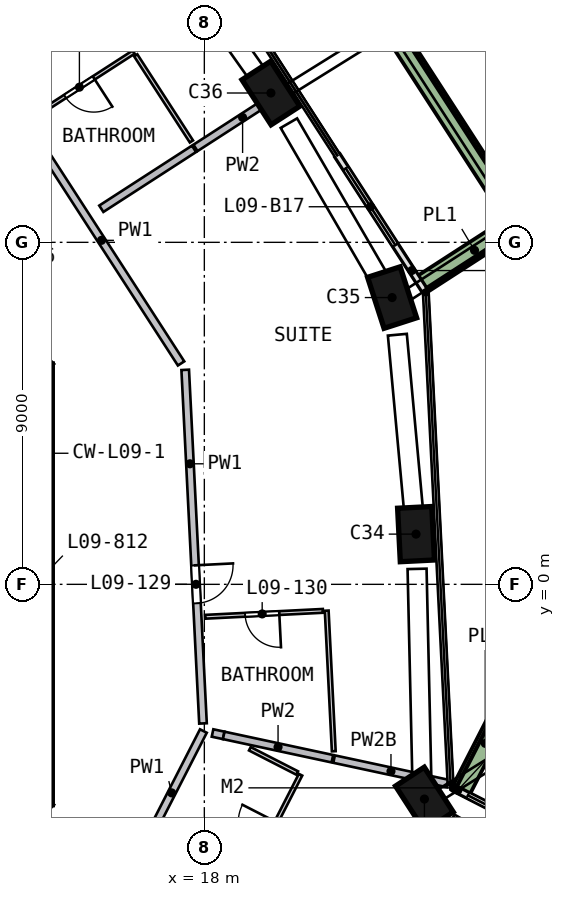
"""IFC4 building model, lengths in metres.
Left out: names, types, materials, properties, quantities, classifications, styles, units other than length and angle.
Written with IfcOpenShell. Run it as: python <this file> out.ifc"""

import sys

from ifc_helpers import new_model, si_unit, direction, frame, frame_2d, origin, origin_2d, place, context, subcontext, project, spatial, rectangle, extrude, element, fill, save


model = new_model("IFC4")
c1 = context("Model", 3, precision=1e-05, world=origin(), true_north=direction((0.0, 1.0)))
c2 = subcontext(c1, "Body", "Model", "MODEL_VIEW")
j1 = project(units=[si_unit("LENGTHUNIT", "METRE"), si_unit("PLANEANGLEUNIT", "RADIAN")], contexts=[c1])
p1 = place(None, origin())
s1 = spatial("IfcSite", under=j1, at=p1, CompositionType="ELEMENT")
p2 = place(p1, origin())
s2 = spatial("IfcBuilding", under=s1, at=p2, CompositionType="ELEMENT")
p3 = place(p2, frame((0.0, 0.0, 46.0)))
s3 = spatial("IfcBuildingStorey", under=s2, at=p3, CompositionType="ELEMENT", Elevation=46.0)
p4 = place(p3, frame((23.759, -5.787, 0.0), z_axis=(0.026605167, 0.113261996, 0.993208883), x_axis=(0.546657728, -0.833486919, 0.080404508)))
e1 = element("IfcColumn", 1, at=p4, inside=s3, PredefinedType="COLUMN", context=c2, shape_type="SweptSolid", body=[
    extrude(rectangle(XDim=1.4, YDim=0.9, at=origin_2d()), origin(), (0.0, 0.0, 1.0), 3.212),
])
p5 = place(p3, frame((23.579, 1.186, 0.0), z_axis=(-0.006616389, 0.112098353, 0.993675089), x_axis=(-0.050128839, 0.992410287, -0.112289451)))
e2 = element("IfcColumn", 2, at=p5, inside=s3, PredefinedType="COLUMN", context=c2, shape_type="SweptSolid", body=[
    extrude(rectangle(XDim=1.4, YDim=0.9, at=origin_2d()), origin(), (0.0, 0.0, 1.0), 3.21),
])
p6 = place(p3, frame((22.985, 7.415, 0.0), z_axis=(-0.036189266, 0.109023965, 0.993380145), x_axis=(0.304935678, -0.945420162, 0.114869271)))
e3 = element("IfcColumn", 3, at=p6, inside=s3, PredefinedType="COLUMN", context=c2, shape_type="SweptSolid", body=[
    extrude(rectangle(XDim=1.4, YDim=0.9, at=origin_2d()), origin(), (0.0, 0.0, 1.0), 3.211),
])
p7 = place(p3, frame((19.826, 12.816, 0.0), z_axis=(-0.061752629, 0.093845743, 0.993669759), x_axis=(-0.539148529, 0.83468518, -0.112336608)))
e4 = element("IfcColumn", 4, at=p7, inside=s3, PredefinedType="COLUMN", context=c2, shape_type="SweptSolid", body=[
    extrude(rectangle(XDim=1.4, YDim=0.9, at=origin_2d()), origin(), (0.0, 0.0, 1.0), 3.21),
])
p8 = place(p3, frame((13.55, -5.799, 0.0), z_axis=(0.0, 0.0, 1.0), x_axis=(0.0, 1.0, 0.0)))
e5 = element("IfcWall", 5, at=p8, inside=s3, PredefinedType="SHEAR", context=c2, shape_type="SweptSolid", body=[
    extrude(rectangle(XDim=11.598, YDim=0.9, at=frame_2d((5.799, 0.0))), origin(), (0.0, 0.0, 1.0), 3.5),
])
p9 = place(p8, frame((4.899, 0.0, 0.0)))
e6 = element("IfcOpeningElement", 6, at=p9, cuts=e5, PredefinedType="OPENING", context=c2, shape_type="SweptSolid", body=[
    extrude(rectangle(XDim=1.8, YDim=2.1, at=frame_2d((0.9, 1.05))), frame((0.0, 0.46, 0.0), z_axis=(0.0, -1.0, 0.0), x_axis=(1.0, 0.0, 0.0)), (0.0, 0.0, 1.0), 0.92),
])
p10 = place(p3, frame((13.682, 5.481, 0.0), z_axis=(0.0, 0.0, 1.0), x_axis=(-0.707106781, 0.707106781, 0.0)))
e7 = element("IfcWall", 7, at=p10, inside=s3, PredefinedType="SHEAR", context=c2, shape_type="SweptSolid", body=[
    extrude(rectangle(XDim=11.598, YDim=0.9, at=frame_2d((5.799, 0.0))), origin(), (0.0, 0.0, 1.0), 3.5),
])
p11 = place(p10, frame((2.099, 0.0, 0.0)))
e8 = element("IfcOpeningElement", 8, at=p11, cuts=e7, PredefinedType="OPENING", context=c2, shape_type="SweptSolid", body=[
    extrude(rectangle(XDim=1.2, YDim=2.1, at=frame_2d((0.6, 1.05))), frame((0.0, 0.46, 0.0), z_axis=(0.0, -1.0, 0.0), x_axis=(1.0, 0.0, 0.0)), (0.0, 0.0, 1.0), 0.92),
])
p12 = place(p3, frame((5.481, -13.682, 0.0), z_axis=(0.0, 0.0, 1.0), x_axis=(0.707106781, 0.707106781, 0.0)))
e9 = element("IfcWall", 9, at=p12, inside=s3, PredefinedType="SHEAR", context=c2, shape_type="SweptSolid", body=[
    extrude(rectangle(XDim=11.598, YDim=0.9, at=frame_2d((5.799, 0.0))), origin(), (0.0, 0.0, 1.0), 3.5),
])
p13 = place(p12, frame((2.099, 0.0, 0.0)))
e10 = element("IfcOpeningElement", 10, at=p13, cuts=e9, PredefinedType="OPENING", context=c2, shape_type="SweptSolid", body=[
    extrude(rectangle(XDim=1.2, YDim=2.1, at=frame_2d((0.6, 1.05))), frame((0.0, 0.46, 0.0), z_axis=(0.0, -1.0, 0.0), x_axis=(1.0, 0.0, 0.0)), (0.0, 0.0, 1.0), 0.92),
])
p14 = place(p3, frame((26.63, -6.42, 0.0), z_axis=(0.0, 0.0, 1.0), x_axis=(-0.890054918, 0.455853312, 0.0)))
e11 = element("IfcWall", 11, at=p14, inside=s3, PredefinedType="SOLIDWALL", context=c2, shape_type="SweptSolid", body=[
    extrude(rectangle(XDim=2.3, YDim=0.15, at=frame_2d((1.15, 0.0))), origin(), (0.0, 0.0, 1.0), 2.425),
])
p15 = place(p14, frame((0.4, 0.0, 0.0)))
e12 = element("IfcOpeningElement", 12, at=p15, cuts=e11, PredefinedType="OPENING", context=c2, shape_type="SweptSolid", body=[
    extrude(rectangle(XDim=1.5, YDim=2.4, at=frame_2d((0.75, 1.2))), frame((0.0, 0.085, 0.0), z_axis=(0.0, -1.0, 0.0), x_axis=(1.0, 0.0, 0.0)), (0.0, 0.0, 1.0), 0.17),
])
p16 = place(p3, frame((23.784, 7.754, 0.0), z_axis=(0.0, 0.0, 1.0), x_axis=(-0.542889562, 0.839804098, 0.0)))
e13 = element("IfcWall", 13, at=p16, inside=s3, PredefinedType="SOLIDWALL", context=c2, shape_type="SweptSolid", body=[
    extrude(rectangle(XDim=4.198, YDim=0.15, at=frame_2d((2.099, 0.0))), origin(), (0.0, 0.0, 1.0), 2.425),
])
p17 = place(p16, frame((1.399, 0.0, 0.0)))
e14 = element("IfcOpeningElement", 14, at=p17, cuts=e13, PredefinedType="OPENING", context=c2, shape_type="SweptSolid", body=[
    extrude(rectangle(XDim=2.4, YDim=2.4, at=frame_2d((1.2, 1.2))), frame((0.0, 0.085, 0.0), z_axis=(0.0, -1.0, 0.0), x_axis=(1.0, 0.0, 0.0)), (0.0, 0.0, 1.0), 0.17),
])
p18 = place(p3, frame((26.008, -2.984, 0.0), z_axis=(0.0, 0.0, 1.0), x_axis=(-0.455840912, -0.890061269, 0.0)))
e15 = element("IfcWall", 15, at=p18, inside=s3, PredefinedType="SOLIDWALL", context=c2, shape_type="SweptSolid", body=[
    extrude(rectangle(XDim=2.699, YDim=0.5, at=frame_2d((1.349, 0.0))), origin(), (0.0, 0.0, 1.0), 0.7),
])
p19 = place(p3, frame((23.766, 7.921, 0.0), z_axis=(0.0, 0.0, 1.0), x_axis=(0.839844411, 0.542827196, 0.0)))
e16 = element("IfcWall", 16, at=p19, inside=s3, PredefinedType="SOLIDWALL", context=c2, shape_type="SweptSolid", body=[
    extrude(rectangle(XDim=3.199, YDim=0.5, at=frame_2d((1.6, 0.0))), origin(), (0.0, 0.0, 1.0), 0.7),
])
p20 = place(p3, frame((26.107, 9.732, 0.0), z_axis=(0.0, 0.0, 1.0), x_axis=(-0.542889903, 0.839803878, 0.0)))
e17 = element("IfcWall", 17, at=p20, inside=s3, PredefinedType="SOLIDWALL", context=c2, shape_type="SweptSolid", body=[
    extrude(rectangle(XDim=13.224, YDim=0.5, at=frame_2d((6.612, 0.0))), origin(), (0.0, 0.0, 1.0), 0.7),
])
p21 = place(p3, frame((12.439, 13.468, 0.0), z_axis=(0.0, 0.0, 1.0), x_axis=(0.542889201, -0.839804331, 0.0)))
e18 = element("IfcWall", 18, at=p21, inside=s3, PredefinedType="SOLIDWALL", context=c2, shape_type="SweptSolid", body=[
    extrude(rectangle(XDim=9.115, YDim=0.2, at=frame_2d((4.558, 0.0))), origin(), (0.0, 0.0, 1.0), 3.19),
])
p22 = place(p21, frame((0.2, 0.0, 0.0)))
e19 = element("IfcOpeningElement", 19, at=p22, cuts=e18, PredefinedType="OPENING", context=c2, shape_type="SweptSolid", body=[
    extrude(rectangle(XDim=1.0, YDim=2.1, at=frame_2d((0.5, 1.05))), frame((0.0, 0.11, 0.0), z_axis=(0.0, -1.0, 0.0), x_axis=(1.0, 0.0, 0.0)), (0.0, 0.0, 1.0), 0.22),
])
p23 = place(p3, frame((16.307, -7.116, 0.0), z_axis=(0.0, 0.0, 1.0), x_axis=(0.455868133, 0.890047327, 0.0)))
e20 = element("IfcWall", 20, at=p23, inside=s3, PredefinedType="SOLIDWALL", context=c2, shape_type="SweptSolid", body=[
    extrude(rectangle(XDim=3.658, YDim=0.2, at=frame_2d((1.829, 0.0))), origin(), (0.0, 0.0, 1.0), 3.19),
])
p24 = place(p3, frame((17.497, 5.644, 0.0), z_axis=(0.0, 0.0, 1.0), x_axis=(0.050236925, -0.998737328, 0.0)))
e21 = element("IfcWall", 21, at=p24, inside=s3, PredefinedType="SOLIDWALL", context=c2, shape_type="SweptSolid", body=[
    extrude(rectangle(XDim=9.316, YDim=0.2, at=frame_2d((4.658, 0.0))), origin(), (0.0, 0.0, 1.0), 3.19),
])
p25 = place(p24, frame((5.15, 0.0, 0.0)))
e22 = element("IfcOpeningElement", 22, at=p25, cuts=e21, PredefinedType="OPENING", context=c2, shape_type="SweptSolid", body=[
    extrude(rectangle(XDim=1.0, YDim=2.1, at=frame_2d((0.5, 1.05))), frame((0.0, 0.11, 0.0), z_axis=(0.0, -1.0, 0.0), x_axis=(1.0, 0.0, 0.0)), (0.0, 0.0, 1.0), 0.22),
])
p26 = place(p3, frame((15.289, 9.884, 0.0), z_axis=(0.0, 0.0, 1.0), x_axis=(0.839815863, 0.542871363, 0.0)))
e23 = element("IfcWall", 23, at=p26, inside=s3, PredefinedType="SOLIDWALL", context=c2, shape_type="SweptSolid", body=[
    extrude(rectangle(XDim=2.905, YDim=0.2, at=frame_2d((1.452, 0.0))), origin(), (0.0, 0.0, 1.0), 3.19),
])
p27 = place(p3, frame((18.216, -3.912, 0.0), z_axis=(0.0, 0.0, 1.0), x_axis=(0.977671617, -0.210138547, 0.0)))
e24 = element("IfcWall", 24, at=p27, inside=s3, PredefinedType="SOLIDWALL", context=c2, shape_type="SweptSolid", body=[
    extrude(rectangle(XDim=0.301, YDim=0.2, at=frame_2d((0.15, 0.0))), origin(), (0.0, 0.0, 1.0), 3.19),
])
p28 = place(p3, frame((17.767, 11.485, 0.0), z_axis=(0.0, 0.0, 1.0), x_axis=(0.839805289, 0.542887721, 0.0)))
e25 = element("IfcWall", 25, at=p28, inside=s3, PredefinedType="SOLIDWALL", context=c2, shape_type="SweptSolid", body=[
    extrude(rectangle(XDim=2.952, YDim=0.2, at=frame_2d((1.476, 0.0))), origin(), (0.0, 0.0, 1.0), 3.19),
])
p29 = place(p3, frame((18.51, -3.975, 0.0), z_axis=(0.0, 0.0, 1.0), x_axis=(0.977711921, -0.209950946, 0.0)))
e26 = element("IfcWall", 26, at=p29, inside=s3, PredefinedType="SOLIDWALL", context=c2, shape_type="SweptSolid", body=[
    extrude(rectangle(XDim=2.925, YDim=0.2, at=frame_2d((1.462, 0.0))), origin(), (0.0, 0.0, 1.0), 3.19),
])
p30 = place(p3, frame((21.414, -4.599, 0.0), z_axis=(0.0, 0.0, 1.0), x_axis=(0.977710131, -0.209959283, 0.0)))
e27 = element("IfcWall", 27, at=p30, inside=s3, PredefinedType="SOLIDWALL", context=c2, shape_type="SweptSolid", body=[
    extrude(rectangle(XDim=3.062, YDim=0.2, at=frame_2d((1.531, 0.0))), origin(), (0.0, 0.0, 1.0), 2.69),
])
p31 = place(p3, frame((16.14, 14.006, 0.0), z_axis=(0.0, 0.0, 1.0), x_axis=(-0.83984229, -0.542830477, 0.0)))
e28 = element("IfcWall", 28, at=p31, inside=s3, PredefinedType="PARTITIONING", context=c2, shape_type="SweptSolid", body=[
    extrude(rectangle(XDim=3.2, YDim=0.1, at=frame_2d((1.6, 0.0))), origin(), (0.0, 0.0, 1.0), 3.19),
])
p32 = place(p31, frame((1.25, 0.0, 0.0)))
e29 = element("IfcOpeningElement", 29, at=p32, cuts=e28, PredefinedType="OPENING", context=c2, shape_type="SweptSolid", body=[
    extrude(rectangle(XDim=0.9, YDim=2.1, at=frame_2d((0.45, 1.05))), frame((0.0, 0.06, 0.0), z_axis=(0.0, -1.0, 0.0), x_axis=(1.0, 0.0, 0.0)), (0.0, 0.0, 1.0), 0.12),
])
p33 = place(p3, frame((16.195, 13.922, 0.0), z_axis=(0.0, 0.0, 1.0), x_axis=(0.542876316, -0.839812661, 0.0)))
e30 = element("IfcWall", 30, at=p33, inside=s3, PredefinedType="PARTITIONING", context=c2, shape_type="SweptSolid", body=[
    extrude(rectangle(XDim=2.7, YDim=0.1, at=frame_2d((1.35, 0.0))), origin(), (0.0, 0.0, 1.0), 3.19),
])
p34 = place(p3, frame((21.12, -0.698, 0.0), z_axis=(0.0, 0.0, 1.0), x_axis=(-0.998736973, -0.050243983, 0.0)))
e31 = element("IfcWall", 31, at=p34, inside=s3, PredefinedType="PARTITIONING", context=c2, shape_type="SweptSolid", body=[
    extrude(rectangle(XDim=3.1, YDim=0.1, at=frame_2d((1.55, 0.0))), origin(), (0.0, 0.0, 1.0), 3.19),
])
p35 = place(p34, frame((1.15, 0.0, 0.0)))
e32 = element("IfcOpeningElement", 32, at=p35, cuts=e31, PredefinedType="OPENING", context=c2, shape_type="SweptSolid", body=[
    extrude(rectangle(XDim=0.9, YDim=2.1, at=frame_2d((0.45, 1.05))), frame((0.0, 0.06, 0.0), z_axis=(0.0, -1.0, 0.0), x_axis=(1.0, 0.0, 0.0)), (0.0, 0.0, 1.0), 0.12),
])
p36 = place(p3, frame((18.891, -8.215, 0.0), z_axis=(0.0, 0.0, 1.0), x_axis=(0.455873249, 0.890044707, 0.0)))
e33 = element("IfcWall", 33, at=p36, inside=s3, PredefinedType="PARTITIONING", context=c2, shape_type="SweptSolid", body=[
    extrude(rectangle(XDim=3.6, YDim=0.1, at=frame_2d((1.8, 0.0))), origin(), (0.0, 0.0, 1.0), 3.19),
])
p37 = place(p36, frame((1.2, 0.0, 0.0)))
e34 = element("IfcOpeningElement", 34, at=p37, cuts=e33, PredefinedType="OPENING", context=c2, shape_type="SweptSolid", body=[
    extrude(rectangle(XDim=1.0, YDim=2.1, at=frame_2d((0.5, 1.05))), frame((0.0, 0.06, 0.0), z_axis=(0.0, -1.0, 0.0), x_axis=(1.0, 0.0, 0.0)), (0.0, 0.0, 1.0), 0.12),
])
p38 = place(p3, frame((19.198, -4.327, 0.0), z_axis=(0.0, 0.0, 1.0), x_axis=(0.889984617, -0.455990549, 0.0)))
e35 = element("IfcWall", 35, at=p38, inside=s3, PredefinedType="PARTITIONING", context=c2, shape_type="SweptSolid", body=[
    extrude(rectangle(XDim=1.398, YDim=0.1, at=frame_2d((0.699, 0.0))), origin(), (0.0, 0.0, 1.0), 3.19),
])
p39 = place(p3, frame((21.22, -0.693, 0.0), z_axis=(0.0, 0.0, 1.0), x_axis=(0.050226916, -0.998737832, 0.0)))
e36 = element("IfcWall", 36, at=p39, inside=s3, PredefinedType="PARTITIONING", context=c2, shape_type="SweptSolid", body=[
    extrude(rectangle(XDim=3.704, YDim=0.1, at=frame_2d((1.852, 0.0))), origin(), (0.0, 0.0, 1.0), 3.19),
])
p40 = place(p15, origin())
e37 = element("IfcDoor", 37, at=p40, inside=s3, OperationType="SLIDING_TO_RIGHT", PredefinedType="DOOR", context=c2, shape_type="SweptSolid", body=[
    extrude(rectangle(XDim=1.5, YDim=2.4, at=frame_2d((0.75, 1.2))), frame((0.0, 0.025, 0.0), z_axis=(0.0, -1.0, 0.0), x_axis=(1.0, 0.0, 0.0)), (0.0, 0.0, 1.0), 0.05),
])
fill(e12, e37)
p41 = place(p17, origin())
e38 = element("IfcDoor", 38, at=p41, inside=s3, OperationType="SLIDING_TO_LEFT", PredefinedType="DOOR", context=c2, shape_type="SweptSolid", body=[
    extrude(rectangle(XDim=2.4, YDim=2.4, at=frame_2d((1.2, 1.2))), frame((0.0, 0.025, 0.0), z_axis=(0.0, -1.0, 0.0), x_axis=(1.0, 0.0, 0.0)), (0.0, 0.0, 1.0), 0.05),
])
fill(e14, e38)
p42 = place(p25, origin())
e39 = element("IfcDoor", 39, at=p42, inside=s3, OperationType="SINGLE_SWING_LEFT", PredefinedType="DOOR", context=c2, shape_type="SweptSolid", body=[
    extrude(rectangle(XDim=1.0, YDim=2.1, at=frame_2d((0.5, 1.05))), frame((0.0, 0.025, 0.0), z_axis=(0.0, -1.0, 0.0), x_axis=(1.0, 0.0, 0.0)), (0.0, 0.0, 1.0), 0.05),
])
fill(e22, e39)
p43 = place(p35, origin())
e40 = element("IfcDoor", 40, at=p43, inside=s3, OperationType="SINGLE_SWING_LEFT", PredefinedType="DOOR", context=c2, shape_type="SweptSolid", body=[
    extrude(rectangle(XDim=0.9, YDim=2.1, at=frame_2d((0.45, 1.05))), frame((0.0, 0.025, 0.0), z_axis=(0.0, -1.0, 0.0), x_axis=(1.0, 0.0, 0.0)), (0.0, 0.0, 1.0), 0.05),
])
fill(e32, e40)
p44 = place(p32, origin())
e41 = element("IfcDoor", 41, at=p44, inside=s3, OperationType="SINGLE_SWING_LEFT", PredefinedType="DOOR", context=c2, shape_type="SweptSolid", body=[
    extrude(rectangle(XDim=0.9, YDim=2.1, at=frame_2d((0.45, 1.05))), frame((0.0, 0.025, 0.0), z_axis=(0.0, -1.0, 0.0), x_axis=(1.0, 0.0, 0.0)), (0.0, 0.0, 1.0), 0.05),
])
fill(e29, e41)
save(model, sys.argv[1])
